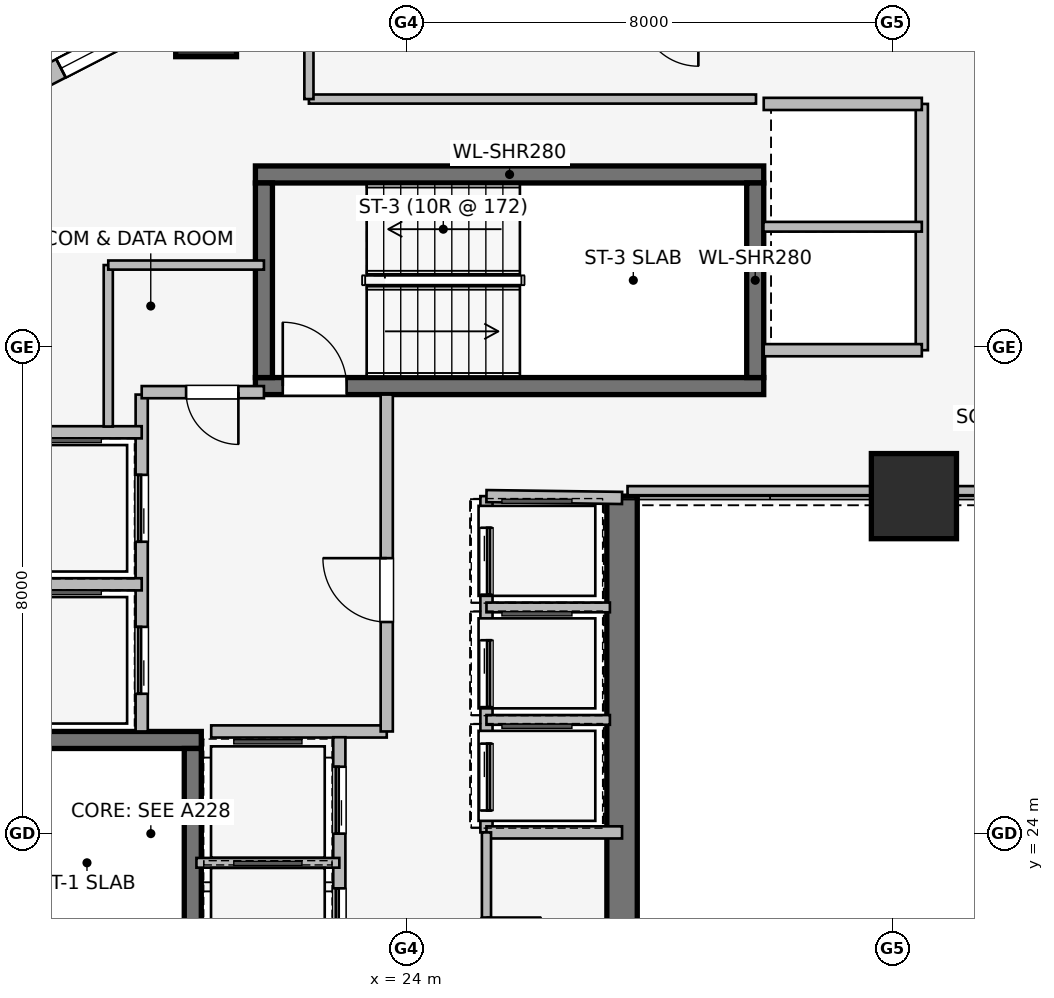
"""IFC4 building model, lengths in metres.
Left out: names, types, materials, properties, quantities, classifications, styles, units other than length and angle.
Written with IfcOpenShell. Run it as: python <this file> out.ifc"""

import sys

from ifc_helpers import new_model, si_unit, direction, frame, frame_2d, origin, origin_2d, place, context, subcontext, project, spatial, rectangle, extrude, element, fill, save


model = new_model("IFC4")
c1 = context("Model", 3, precision=1e-05, world=origin(), true_north=direction((0.0, 1.0)))
c2 = subcontext(c1, "Body", "Model", "MODEL_VIEW")
j1 = project(units=[si_unit("LENGTHUNIT", "METRE"), si_unit("PLANEANGLEUNIT", "RADIAN")], contexts=[c1])
p1 = place(None, origin())
s1 = spatial("IfcSite", under=j1, at=p1, CompositionType="ELEMENT")
p2 = place(p1, origin())
s2 = spatial("IfcBuilding", under=s1, at=p2, CompositionType="ELEMENT")
p3 = place(p2, frame((0.0, 0.0, 101.55)))
s3 = spatial("IfcBuildingStorey", under=s2, at=p3, CompositionType="ELEMENT", Elevation=101.55)
p4 = place(p3, frame((27.55, 29.55, 0.0), z_axis=(0.0, 0.0, 1.0), x_axis=(0.0, -1.0, 0.0)))
e1 = element("IfcWall", 1, at=p4, inside=s3, PredefinedType="SHEAR", context=c2, shape_type="SweptSolid", body=[
    extrude(rectangle(XDim=11.25, YDim=0.5, at=frame_2d((5.625, 0.0))), origin(), (0.0, 0.0, 1.0), 3.45),
])
p5 = place(p3, frame((20.63, 25.54, 0.0), z_axis=(0.0, 0.0, 1.0), x_axis=(-1.0, 0.0, 0.0)))
e2 = element("IfcWall", 2, at=p5, inside=s3, PredefinedType="SHEAR", context=c2, shape_type="SweptSolid", body=[
    extrude(rectangle(XDim=3.76, YDim=0.28, at=frame_2d((1.88, 0.0))), origin(), (0.0, 0.0, 1.0), 3.45),
])
p6 = place(p3, frame((20.49, 17.6, 0.0), z_axis=(0.0, 0.0, 1.0), x_axis=(0.0, 1.0, 0.0)))
e3 = element("IfcWall", 3, at=p6, inside=s3, PredefinedType="SHEAR", context=c2, shape_type="SweptSolid", body=[
    extrude(rectangle(XDim=7.8, YDim=0.28, at=frame_2d((3.9, 0.0))), origin(), (0.0, 0.0, 1.0), 3.45),
])
p7 = place(p6, frame((0.44, 0.0, 0.0)))
e4 = element("IfcOpeningElement", 4, at=p7, cuts=e3, PredefinedType="OPENING", context=c2, shape_type="SweptSolid", body=[
    extrude(rectangle(XDim=1.05, YDim=2.0, at=frame_2d((0.525, 1.0))), frame((0.0, 0.15, 0.0), z_axis=(0.0, -1.0, 0.0), x_axis=(1.0, 0.0, 0.0)), (0.0, 0.0, 1.0), 0.3),
])
p8 = place(p3, frame((21.52, 31.36, 0.0), z_axis=(0.0, 0.0, 1.0), x_axis=(1.0, 0.0, 0.0)))
e5 = element("IfcWall", 5, at=p8, inside=s3, PredefinedType="SHEAR", context=c2, shape_type="SweptSolid", body=[
    extrude(rectangle(XDim=8.36, YDim=0.28, at=frame_2d((4.18, 0.0))), origin(), (0.0, 0.0, 1.0), 3.45),
])
p9 = place(p8, frame((0.45, 0.0, 0.0)))
e6 = element("IfcOpeningElement", 6, at=p9, cuts=e5, PredefinedType="OPENING", context=c2, shape_type="SweptSolid", body=[
    extrude(rectangle(XDim=1.05, YDim=2.0, at=frame_2d((0.525, 1.0))), frame((0.0, 0.15, 0.0), z_axis=(0.0, -1.0, 0.0), x_axis=(1.0, 0.0, 0.0)), (0.0, 0.0, 1.0), 0.3),
])
p10 = place(p3, frame((29.88, 34.84, 0.0), z_axis=(0.0, 0.0, 1.0), x_axis=(-1.0, 0.0, 0.0)))
e7 = element("IfcWall", 7, at=p10, inside=s3, PredefinedType="SHEAR", context=c2, shape_type="SweptSolid", body=[
    extrude(rectangle(XDim=8.36, YDim=0.28, at=frame_2d((4.18, 0.0))), origin(), (0.0, 0.0, 1.0), 3.45),
])
for number, where, z_axis, x_axis in (
    (8, (21.66, 34.7, 0.0), (0.0, 0.0, 1.0), (0.0, -1.0, 0.0)),
    (9, (29.74, 31.5, 0.0), (0.0, 0.0, 1.0), (0.0, 1.0, 0.0)),
):
    element("IfcWall", number, at=place(p3, frame(where, z_axis=z_axis, x_axis=x_axis)), inside=s3, PredefinedType="SHEAR", context=c2, shape_type="SweptSolid", body=[
        extrude(rectangle(XDim=3.2, YDim=0.28, at=frame_2d((1.6, 0.0))), origin(), (0.0, 0.0, 1.0), 3.45),
    ])
p11 = place(p3, frame((32.35, 29.55, 0.0), z_axis=(0.0, 0.0, 1.0), x_axis=(1.0, 0.0, 0.0)))
e10 = element("IfcColumn", 10, at=p11, inside=s3, PredefinedType="COLUMN", context=c2, shape_type="SweptSolid", body=[
    extrude(rectangle(XDim=1.4, YDim=1.4, at=origin_2d()), origin(), (0.0, 0.0, 1.0), 3.45),
])
p12 = place(p3, frame((20.709, 37.277, 0.0), z_axis=(0.0, 0.0, 1.0), x_axis=(1.0, 0.0, 0.0)))
e11 = element("IfcColumn", 11, at=p12, inside=s3, PredefinedType="COLUMN", context=c2, shape_type="SweptSolid", body=[
    extrude(rectangle(XDim=1.0, YDim=1.0, at=origin_2d()), origin(), (0.0, 0.0, 1.0), 3.45),
])
p13 = place(p3, frame((17.169, 35.99, 0.0), z_axis=(0.0, 0.0, 1.0), x_axis=(0.888613612362, 0.458656568606, 0.0)))
e12 = element("IfcWall", 12, at=p13, inside=s3, PredefinedType="STANDARD", context=c2, shape_type="SweptSolid", body=[
    extrude(rectangle(XDim=18.681, YDim=0.34, at=frame_2d((9.34, 0.0))), origin(), (0.0, 0.0, 1.0), 2.494),
])
p14 = place(p13, frame((1.298, 0.0, 0.75)))
e13 = element("IfcOpeningElement", 13, at=p14, cuts=e12, PredefinedType="OPENING", context=c2, shape_type="SweptSolid", body=[
    extrude(rectangle(XDim=1.05, YDim=1.4, at=frame_2d((0.525, 0.7))), frame((0.0, 0.18, 0.0), z_axis=(0.0, -1.0, 0.0), x_axis=(1.0, 0.0, 0.0)), (0.0, 0.0, 1.0), 0.36),
])
p15 = place(p13, frame((4.981, 0.0, 0.75)))
e14 = element("IfcOpeningElement", 14, at=p15, cuts=e12, PredefinedType="OPENING", context=c2, shape_type="SweptSolid", body=[
    extrude(rectangle(XDim=2.1, YDim=1.5, at=frame_2d((1.05, 0.75))), frame((0.0, 0.18, 0.0), z_axis=(0.0, -1.0, 0.0), x_axis=(1.0, 0.0, 0.0)), (0.0, 0.0, 1.0), 0.36),
])
p16 = place(p13, frame((8.29, 0.0, 0.75)))
e15 = element("IfcOpeningElement", 15, at=p16, cuts=e12, PredefinedType="OPENING", context=c2, shape_type="SweptSolid", body=[
    extrude(rectangle(XDim=2.1, YDim=1.5, at=frame_2d((1.05, 0.75))), frame((0.0, 0.18, 0.0), z_axis=(0.0, -1.0, 0.0), x_axis=(1.0, 0.0, 0.0)), (0.0, 0.0, 1.0), 0.36),
])
p17 = place(p13, frame((11.6, 0.0, 0.75)))
e16 = element("IfcOpeningElement", 16, at=p17, cuts=e12, PredefinedType="OPENING", context=c2, shape_type="SweptSolid", body=[
    extrude(rectangle(XDim=2.1, YDim=1.5, at=frame_2d((1.05, 0.75))), frame((0.0, 0.18, 0.0), z_axis=(0.0, -1.0, 0.0), x_axis=(1.0, 0.0, 0.0)), (0.0, 0.0, 1.0), 0.36),
])
p18 = place(p13, frame((16.333, 0.0, 0.75)))
e17 = element("IfcOpeningElement", 17, at=p18, cuts=e12, PredefinedType="OPENING", context=c2, shape_type="SweptSolid", body=[
    extrude(rectangle(XDim=1.05, YDim=1.4, at=frame_2d((0.525, 0.7))), frame((0.0, 0.18, 0.0), z_axis=(0.0, -1.0, 0.0), x_axis=(1.0, 0.0, 0.0)), (0.0, 0.0, 1.0), 0.36),
])
p19 = place(p3, frame((19.65, 25.68, 0.0), z_axis=(0.0, 0.0, 1.0), x_axis=(0.0, 1.0, 0.0)))
e18 = element("IfcWall", 18, at=p19, inside=s3, PredefinedType="PARTITIONING", context=c2, shape_type="SweptSolid", body=[
    extrude(rectangle(XDim=5.54, YDim=0.2, at=frame_2d((2.77, 0.0))), origin(), (0.0, 0.0, 1.0), 3.19),
])
p20 = place(p19, frame((0.62, 0.0, 0.0)))
e19 = element("IfcOpeningElement", 19, at=p20, cuts=e18, PredefinedType="OPENING", context=c2, shape_type="SweptSolid", body=[
    extrude(rectangle(XDim=1.1, YDim=2.2, at=frame_2d((0.55, 1.1))), frame((0.0, 0.11, 0.0), z_axis=(0.0, -1.0, 0.0), x_axis=(1.0, 0.0, 0.0)), (0.0, 0.0, 1.0), 0.22),
])
p21 = place(p19, frame((3.12, 0.0, 0.0)))
e20 = element("IfcOpeningElement", 20, at=p21, cuts=e18, PredefinedType="OPENING", context=c2, shape_type="SweptSolid", body=[
    extrude(rectangle(XDim=1.1, YDim=2.2, at=frame_2d((0.55, 1.1))), frame((0.0, 0.11, 0.0), z_axis=(0.0, -1.0, 0.0), x_axis=(1.0, 0.0, 0.0)), (0.0, 0.0, 1.0), 0.22),
])
p22 = place(p3, frame((20.793, 25.68, 0.0), z_axis=(0.0, 0.0, 1.0), x_axis=(1.0, 0.0, 0.0)))
e21 = element("IfcWall", 21, at=p22, inside=s3, PredefinedType="PARTITIONING", context=c2, shape_type="SweptSolid", body=[
    extrude(rectangle(XDim=2.887, YDim=0.2, at=frame_2d((1.443, 0.0))), origin(), (0.0, 0.0, 1.0), 3.19),
])
p23 = place(p3, frame((23.68, 25.68, 0.0), z_axis=(0.0, 0.0, 1.0), x_axis=(0.0, 1.0, 0.0)))
e22 = element("IfcWall", 22, at=p23, inside=s3, PredefinedType="PARTITIONING", context=c2, shape_type="SweptSolid", body=[
    extrude(rectangle(XDim=5.54, YDim=0.2, at=frame_2d((2.77, 0.0))), origin(), (0.0, 0.0, 1.0), 3.19),
])
p24 = place(p23, frame((1.8, 0.0, 0.0)))
e23 = element("IfcOpeningElement", 23, at=p24, cuts=e22, PredefinedType="OPENING", context=c2, shape_type="SweptSolid", body=[
    extrude(rectangle(XDim=1.05, YDim=2.0, at=frame_2d((0.525, 1.0))), frame((0.0, 0.11, 0.0), z_axis=(0.0, -1.0, 0.0), x_axis=(1.0, 0.0, 0.0)), (0.0, 0.0, 1.0), 0.22),
])
p25 = place(p3, frame((21.66, 31.26, 0.0), z_axis=(0.0, 0.0, 1.0), x_axis=(-1.0, 0.0, 0.0)))
e24 = element("IfcWall", 24, at=p25, inside=s3, PredefinedType="PARTITIONING", context=c2, shape_type="SweptSolid", body=[
    extrude(rectangle(XDim=2.01, YDim=0.2, at=frame_2d((1.005, 0.0))), origin(), (0.0, 0.0, 1.0), 3.19),
])
p26 = place(p25, frame((0.42, 0.0, 0.0)))
e25 = element("IfcOpeningElement", 25, at=p26, cuts=e24, PredefinedType="OPENING", context=c2, shape_type="SweptSolid", body=[
    extrude(rectangle(XDim=0.86, YDim=2.0, at=frame_2d((0.43, 1.0))), frame((0.0, 0.11, 0.0), z_axis=(0.0, -1.0, 0.0), x_axis=(1.0, 0.0, 0.0)), (0.0, 0.0, 1.0), 0.22),
])
p27 = place(p3, frame((17.15, 28.1, 0.0), z_axis=(0.0, 0.0, 1.0), x_axis=(1.0, 0.0, 0.0)))
e26 = element("IfcWall", 26, at=p27, inside=s3, PredefinedType="PARTITIONING", context=c2, shape_type="SweptSolid", body=[
    extrude(rectangle(XDim=2.5, YDim=0.2, at=frame_2d((1.25, 0.0))), origin(), (0.0, 0.0, 1.0), 3.19),
])
p28 = place(p3, frame((19.65, 30.6, 0.0), z_axis=(0.0, 0.0, 1.0), x_axis=(-1.0, 0.0, 0.0)))
e27 = element("IfcWall", 27, at=p28, inside=s3, PredefinedType="PARTITIONING", context=c2, shape_type="SweptSolid", body=[
    extrude(rectangle(XDim=2.5, YDim=0.2, at=frame_2d((1.25, 0.0))), origin(), (0.0, 0.0, 1.0), 2.09),
])
p29 = place(p3, frame((32.48, 31.95, 0.0), z_axis=(0.0, 0.0, 1.0), x_axis=(0.0, 1.0, 0.0)))
e28 = element("IfcWall", 28, at=p29, inside=s3, PredefinedType="PARTITIONING", context=c2, shape_type="SweptSolid", body=[
    extrude(rectangle(XDim=4.05, YDim=0.2, at=frame_2d((2.025, 0.0))), origin(), (0.0, 0.0, 1.0), 3.19),
])
p30 = place(p3, frame((29.88, 36.0, 0.0), z_axis=(0.0, 0.0, 1.0), x_axis=(1.0, 0.0, 0.0)))
e29 = element("IfcWall", 29, at=p30, inside=s3, PredefinedType="PARTITIONING", context=c2, shape_type="SweptSolid", body=[
    extrude(rectangle(XDim=2.6, YDim=0.2, at=frame_2d((1.3, 0.0))), origin(), (0.0, 0.0, 1.0), 2.582),
])
p31 = place(p3, frame((32.48, 31.95, 0.0), z_axis=(0.0, 0.0, 1.0), x_axis=(-1.0, 0.0, 0.0)))
e30 = element("IfcWall", 30, at=p31, inside=s3, PredefinedType="PARTITIONING", context=c2, shape_type="SweptSolid", body=[
    extrude(rectangle(XDim=2.6, YDim=0.2, at=frame_2d((1.3, 0.0))), origin(), (0.0, 0.0, 1.0), 3.19),
])
p32 = place(p3, frame((29.875, 33.98, 0.0), z_axis=(0.0, 0.0, 1.0), x_axis=(1.0, 0.0, 0.0)))
e31 = element("IfcWall", 31, at=p32, inside=s3, PredefinedType="PARTITIONING", context=c2, shape_type="SweptSolid", body=[
    extrude(rectangle(XDim=2.605, YDim=0.16, at=frame_2d((1.302, 0.0))), origin(), (0.0, 0.0, 1.0), 3.19),
])
p33 = place(p3, frame((22.9, 19.5, 0.0), z_axis=(0.0, 0.0, 1.0), x_axis=(0.0, 1.0, 0.0)))
e32 = element("IfcWall", 32, at=p33, inside=s3, PredefinedType="PARTITIONING", context=c2, shape_type="SweptSolid", body=[
    extrude(rectangle(XDim=6.085, YDim=0.2, at=frame_2d((3.042, 0.0))), origin(), (0.0, 0.0, 1.0), 3.19),
])
p34 = place(p33, frame((0.68, 0.0, 0.0)))
e33 = element("IfcOpeningElement", 33, at=p34, cuts=e32, PredefinedType="OPENING", context=c2, shape_type="SweptSolid", body=[
    extrude(rectangle(XDim=1.1, YDim=2.2, at=frame_2d((0.55, 1.1))), frame((0.0, 0.11, 0.0), z_axis=(0.0, -1.0, 0.0), x_axis=(1.0, 0.0, 0.0)), (0.0, 0.0, 1.0), 0.22),
])
p35 = place(p33, frame((2.5, 0.0, 0.0)))
e34 = element("IfcOpeningElement", 34, at=p35, cuts=e32, PredefinedType="OPENING", context=c2, shape_type="SweptSolid", body=[
    extrude(rectangle(XDim=1.1, YDim=2.2, at=frame_2d((0.55, 1.1))), frame((0.0, 0.11, 0.0), z_axis=(0.0, -1.0, 0.0), x_axis=(1.0, 0.0, 0.0)), (0.0, 0.0, 1.0), 0.22),
])
p36 = place(p33, frame((4.5, 0.0, 0.0)))
e35 = element("IfcOpeningElement", 35, at=p36, cuts=e32, PredefinedType="OPENING", context=c2, shape_type="SweptSolid", body=[
    extrude(rectangle(XDim=1.1, YDim=2.2, at=frame_2d((0.55, 1.1))), frame((0.0, 0.11, 0.0), z_axis=(0.0, -1.0, 0.0), x_axis=(1.0, 0.0, 0.0)), (0.0, 0.0, 1.0), 0.22),
])
p37 = place(p3, frame((20.55, 23.52, 0.0), z_axis=(0.0, 0.0, 1.0), x_axis=(1.0, 0.0, 0.0)))
e36 = element("IfcWall", 36, at=p37, inside=s3, PredefinedType="PARTITIONING", context=c2, shape_type="SweptSolid", body=[
    extrude(rectangle(XDim=2.35, YDim=0.16, at=frame_2d((1.175, 0.0))), origin(), (0.0, 0.0, 1.0), 3.19),
])
p38 = place(p3, frame((25.32, 29.55, 0.0), z_axis=(0.0, 0.0, 1.0), x_axis=(0.0, -1.0, 0.0)))
e37 = element("IfcWall", 37, at=p38, inside=s3, PredefinedType="PARTITIONING", context=c2, shape_type="SweptSolid", body=[
    extrude(rectangle(XDim=5.53, YDim=0.2, at=frame_2d((2.765, 0.0))), origin(), (0.0, 0.0, 1.0), 3.19),
])
p39 = place(p38, frame((0.52, 0.0, 0.0)))
e38 = element("IfcOpeningElement", 38, at=p39, cuts=e37, PredefinedType="OPENING", context=c2, shape_type="SweptSolid", body=[
    extrude(rectangle(XDim=1.1, YDim=2.2, at=frame_2d((0.55, 1.1))), frame((0.0, 0.11, 0.0), z_axis=(0.0, -1.0, 0.0), x_axis=(1.0, 0.0, 0.0)), (0.0, 0.0, 1.0), 0.22),
])
p40 = place(p38, frame((2.37, 0.0, 0.0)))
e39 = element("IfcOpeningElement", 39, at=p40, cuts=e37, PredefinedType="OPENING", context=c2, shape_type="SweptSolid", body=[
    extrude(rectangle(XDim=1.1, YDim=2.2, at=frame_2d((0.55, 1.1))), frame((0.0, 0.11, 0.0), z_axis=(0.0, -1.0, 0.0), x_axis=(1.0, 0.0, 0.0)), (0.0, 0.0, 1.0), 0.22),
])
p41 = place(p38, frame((4.07, 0.0, 0.0)))
e40 = element("IfcOpeningElement", 40, at=p41, cuts=e37, PredefinedType="OPENING", context=c2, shape_type="SweptSolid", body=[
    extrude(rectangle(XDim=1.1, YDim=2.2, at=frame_2d((0.55, 1.1))), frame((0.0, 0.11, 0.0), z_axis=(0.0, -1.0, 0.0), x_axis=(1.0, 0.0, 0.0)), (0.0, 0.0, 1.0), 0.22),
])
p42 = place(p3, frame((27.55, 29.52, 0.0), z_axis=(0.0, 0.0, 1.0), x_axis=(-0.999909343457, 0.013464949556, 0.0)))
e41 = element("IfcWall", 41, at=p42, inside=s3, PredefinedType="PARTITIONING", context=c2, shape_type="SweptSolid", body=[
    extrude(rectangle(XDim=2.23, YDim=0.2, at=frame_2d((1.115, 0.0))), origin(), (0.0, 0.0, 1.0), 2.09),
])
p43 = place(p3, frame((25.32, 24.02, 0.0), z_axis=(0.0, 0.0, 1.0), x_axis=(1.0, 0.0, 0.0)))
e42 = element("IfcWall", 42, at=p43, inside=s3, PredefinedType="PARTITIONING", context=c2, shape_type="SweptSolid", body=[
    extrude(rectangle(XDim=2.23, YDim=0.2, at=frame_2d((1.115, 0.0))), origin(), (0.0, 0.0, 1.0), 3.19),
])
for number, where, z_axis, x_axis in (
    (43, (25.32, 25.87, 0.0), (0.0, 0.0, 1.0), (1.0, 0.0, 0.0)),
    (44, (25.32, 27.72, 0.0), (0.0, 0.0, 1.0), (1.0, 0.0, 0.0)),
):
    element("IfcWall", number, at=place(p3, frame(where, z_axis=z_axis, x_axis=x_axis)), inside=s3, PredefinedType="PARTITIONING", context=c2, shape_type="SweptSolid", body=[
        extrude(rectangle(XDim=2.03, YDim=0.16, at=frame_2d((1.015, 0.0))), origin(), (0.0, 0.0, 1.0), 3.19),
    ])
p44 = place(p3, frame((25.32, 24.02, 0.0), z_axis=(0.0, 0.0, 1.0), x_axis=(0.0, -1.0, 0.0)))
e45 = element("IfcWall", 45, at=p44, inside=s3, PredefinedType="PARTITIONING", context=c2, shape_type="SweptSolid", body=[
    extrude(rectangle(XDim=3.8, YDim=0.15, at=frame_2d((1.9, 0.0))), origin(), (0.0, 0.0, 1.0), 3.19),
])
p45 = place(p44, frame((1.4, 0.0, 0.0)))
e46 = element("IfcOpeningElement", 46, at=p45, cuts=e45, PredefinedType="OPENING", context=c2, shape_type="SweptSolid", body=[
    extrude(rectangle(XDim=0.9, YDim=2.0, at=frame_2d((0.45, 1.0))), frame((0.0, 0.085, 0.0), z_axis=(0.0, -1.0, 0.0), x_axis=(1.0, 0.0, 0.0)), (0.0, 0.0, 1.0), 0.17),
])
p46 = place(p3, frame((19.1, 33.35, 0.0), z_axis=(0.0, 0.0, 1.0), x_axis=(0.0, -1.0, 0.0)))
e47 = element("IfcWall", 47, at=p46, inside=s3, PredefinedType="PARTITIONING", context=c2, shape_type="SweptSolid", body=[
    extrude(rectangle(XDim=2.655, YDim=0.15, at=frame_2d((1.328, 0.0))), origin(), (0.0, 0.0, 1.0), 2.42),
])
p47 = place(p3, frame((21.66, 33.35, 0.0), z_axis=(0.0, 0.0, 1.0), x_axis=(-1.0, 0.0, 0.0)))
e48 = element("IfcWall", 48, at=p47, inside=s3, PredefinedType="PARTITIONING", context=c2, shape_type="SweptSolid", body=[
    extrude(rectangle(XDim=2.56, YDim=0.15, at=frame_2d((1.28, 0.0))), origin(), (0.0, 0.0, 1.0), 3.19),
])
p48 = place(p3, frame((39.84, 29.64, 0.0), z_axis=(0.0, 0.0, 1.0), x_axis=(-1.0, 0.0, 0.0)))
e49 = element("IfcWall", 49, at=p48, inside=s3, PredefinedType="PARTITIONING", context=c2, shape_type="SweptSolid", body=[
    extrude(rectangle(XDim=12.2, YDim=0.15, at=frame_2d((6.1, 0.0))), origin(), (0.0, 0.0, 1.0), 2.331),
])
p49 = place(p3, frame((29.753, 36.08, 0.0), z_axis=(0.0, 0.0, 1.0), x_axis=(-1.0, 0.0, 0.0)))
e50 = element("IfcWall", 50, at=p49, inside=s3, PredefinedType="PARTITIONING", context=c2, shape_type="SweptSolid", body=[
    extrude(rectangle(XDim=7.353, YDim=0.15, at=frame_2d((3.677, 0.0))), origin(), (0.0, 0.0, 1.0), 2.657),
])
p50 = place(p3, frame((22.4, 36.08, 0.0), z_axis=(0.0, 0.0, 1.0), x_axis=(0.0, 1.0, 0.0)))
e51 = element("IfcWall", 51, at=p50, inside=s3, PredefinedType="PARTITIONING", context=c2, shape_type="SweptSolid", body=[
    extrude(rectangle(XDim=1.43, YDim=0.15, at=frame_2d((0.715, 0.0))), origin(), (0.0, 0.0, 1.0), 3.19),
])
p51 = place(p14, origin())
e52 = element("IfcWindow", 52, at=p51, inside=s3, PartitioningType="SINGLE_PANEL", PredefinedType="WINDOW", context=c2, shape_type="SweptSolid", body=[
    extrude(rectangle(XDim=1.05, YDim=1.4, at=frame_2d((0.525, 0.7))), frame((0.0, 0.03, 0.0), z_axis=(0.0, -1.0, 0.0), x_axis=(1.0, 0.0, 0.0)), (0.0, 0.0, 1.0), 0.06),
])
fill(e13, e52)
p52 = place(p9, origin())
e53 = element("IfcDoor", 53, at=p52, inside=s3, OperationType="SINGLE_SWING_LEFT", PredefinedType="DOOR", context=c2, shape_type="SweptSolid", body=[
    extrude(rectangle(XDim=1.05, YDim=2.0, at=frame_2d((0.525, 1.0))), frame((0.0, 0.025, 0.0), z_axis=(0.0, -1.0, 0.0), x_axis=(1.0, 0.0, 0.0)), (0.0, 0.0, 1.0), 0.05),
])
fill(e6, e53)
p53 = place(p20, origin())
e54 = element("IfcDoor", 54, at=p53, inside=s3, OperationType="SLIDING_TO_LEFT", PredefinedType="DOOR", context=c2, shape_type="SweptSolid", body=[
    extrude(rectangle(XDim=1.1, YDim=2.2, at=frame_2d((0.55, 1.1))), frame((0.0, 0.025, 0.0), z_axis=(0.0, -1.0, 0.0), x_axis=(1.0, 0.0, 0.0)), (0.0, 0.0, 1.0), 0.05),
])
fill(e19, e54)
p54 = place(p21, origin())
e55 = element("IfcDoor", 55, at=p54, inside=s3, OperationType="SLIDING_TO_LEFT", PredefinedType="DOOR", context=c2, shape_type="SweptSolid", body=[
    extrude(rectangle(XDim=1.1, YDim=2.2, at=frame_2d((0.55, 1.1))), frame((0.0, 0.025, 0.0), z_axis=(0.0, -1.0, 0.0), x_axis=(1.0, 0.0, 0.0)), (0.0, 0.0, 1.0), 0.05),
])
fill(e20, e55)
p55 = place(p24, origin())
e56 = element("IfcDoor", 56, at=p55, inside=s3, OperationType="SINGLE_SWING_RIGHT", PredefinedType="DOOR", context=c2, shape_type="SweptSolid", body=[
    extrude(rectangle(XDim=1.05, YDim=2.0, at=frame_2d((0.525, 1.0))), frame((0.0, 0.025, 0.0), z_axis=(0.0, -1.0, 0.0), x_axis=(1.0, 0.0, 0.0)), (0.0, 0.0, 1.0), 0.05),
])
fill(e23, e56)
p56 = place(p26, origin())
e57 = element("IfcDoor", 57, at=p56, inside=s3, OperationType="SINGLE_SWING_LEFT", PredefinedType="DOOR", context=c2, shape_type="SweptSolid", body=[
    extrude(rectangle(XDim=0.86, YDim=2.0, at=frame_2d((0.43, 1.0))), frame((0.0, 0.025, 0.0), z_axis=(0.0, -1.0, 0.0), x_axis=(1.0, 0.0, 0.0)), (0.0, 0.0, 1.0), 0.05),
])
fill(e25, e57)
p57 = place(p35, origin())
e58 = element("IfcDoor", 58, at=p57, inside=s3, OperationType="SLIDING_TO_LEFT", PredefinedType="DOOR", context=c2, shape_type="SweptSolid", body=[
    extrude(rectangle(XDim=1.1, YDim=2.2, at=frame_2d((0.55, 1.1))), frame((0.0, 0.025, 0.0), z_axis=(0.0, -1.0, 0.0), x_axis=(1.0, 0.0, 0.0)), (0.0, 0.0, 1.0), 0.05),
])
fill(e34, e58)
p58 = place(p36, origin())
e59 = element("IfcDoor", 59, at=p58, inside=s3, OperationType="SLIDING_TO_LEFT", PredefinedType="DOOR", context=c2, shape_type="SweptSolid", body=[
    extrude(rectangle(XDim=1.1, YDim=2.2, at=frame_2d((0.55, 1.1))), frame((0.0, 0.025, 0.0), z_axis=(0.0, -1.0, 0.0), x_axis=(1.0, 0.0, 0.0)), (0.0, 0.0, 1.0), 0.05),
])
fill(e35, e59)
p59 = place(p39, origin())
e60 = element("IfcDoor", 60, at=p59, inside=s3, OperationType="SLIDING_TO_LEFT", PredefinedType="DOOR", context=c2, shape_type="SweptSolid", body=[
    extrude(rectangle(XDim=1.1, YDim=2.2, at=frame_2d((0.55, 1.1))), frame((0.0, 0.025, 0.0), z_axis=(0.0, -1.0, 0.0), x_axis=(1.0, 0.0, 0.0)), (0.0, 0.0, 1.0), 0.05),
])
fill(e38, e60)
p60 = place(p40, origin())
e61 = element("IfcDoor", 61, at=p60, inside=s3, OperationType="SLIDING_TO_LEFT", PredefinedType="DOOR", context=c2, shape_type="SweptSolid", body=[
    extrude(rectangle(XDim=1.1, YDim=2.2, at=frame_2d((0.55, 1.1))), frame((0.0, 0.025, 0.0), z_axis=(0.0, -1.0, 0.0), x_axis=(1.0, 0.0, 0.0)), (0.0, 0.0, 1.0), 0.05),
])
fill(e39, e61)
p61 = place(p41, origin())
e62 = element("IfcDoor", 62, at=p61, inside=s3, OperationType="SLIDING_TO_LEFT", PredefinedType="DOOR", context=c2, shape_type="SweptSolid", body=[
    extrude(rectangle(XDim=1.1, YDim=2.2, at=frame_2d((0.55, 1.1))), frame((0.0, 0.025, 0.0), z_axis=(0.0, -1.0, 0.0), x_axis=(1.0, 0.0, 0.0)), (0.0, 0.0, 1.0), 0.05),
])
fill(e40, e62)
p62 = place(p45, origin())
e63 = element("IfcDoor", 63, at=p62, inside=s3, OperationType="SINGLE_SWING_LEFT", PredefinedType="DOOR", context=c2, shape_type="SweptSolid", body=[
    extrude(rectangle(XDim=0.9, YDim=2.0, at=frame_2d((0.45, 1.0))), frame((0.0, 0.025, 0.0), z_axis=(0.0, -1.0, 0.0), x_axis=(1.0, 0.0, 0.0)), (0.0, 0.0, 1.0), 0.05),
])
fill(e46, e63)
save(model, sys.argv[1])
